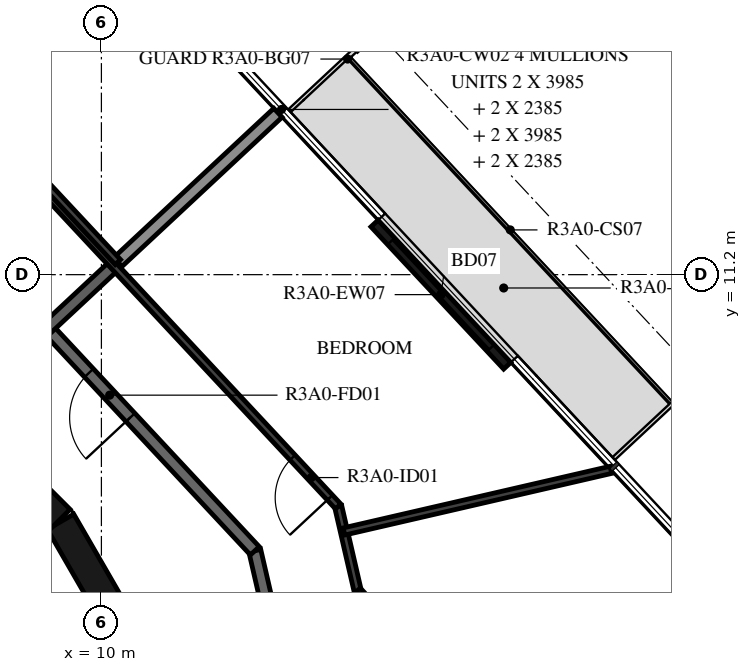
"""IFC4 building model, lengths in metres.
Left out: names, types, materials, properties, quantities, classifications, styles, units other than length and angle.
Written with IfcOpenShell. Run it as: python <this file> out.ifc"""

import sys

from ifc_helpers import new_model, si_unit, direction, frame, frame_2d, origin, place, context, subcontext, project, spatial, rectangle, extrude, element, fill, save


model = new_model("IFC4")
c1 = context("Model", 3, precision=1e-05, world=origin(), true_north=direction((0.0, 1.0)))
c2 = subcontext(c1, "Body", "Model", "MODEL_VIEW")
j1 = project(units=[si_unit("LENGTHUNIT", "METRE"), si_unit("PLANEANGLEUNIT", "RADIAN")], contexts=[c1])
p1 = place(None, origin())
s1 = spatial("IfcSite", under=j1, at=p1, CompositionType="ELEMENT")
p2 = place(p1, origin())
s2 = spatial("IfcBuilding", under=s1, at=p2, CompositionType="ELEMENT")
p3 = place(p2, frame((0.0, 0.0, 120.4)))
s3 = spatial("IfcBuildingStorey", under=s2, at=p3, CompositionType="ELEMENT", Elevation=120.4)
p4 = place(p3, frame((16.674, 9.701, 0.0), z_axis=(0.0, 0.0, 1.0), x_axis=(-0.681994703002, 0.731357111866, 0.0)))
e1 = element("IfcWall", 1, at=p4, inside=s3, PredefinedType="STANDARD", context=c2, shape_type="SweptSolid", body=[
    extrude(rectangle(XDim=3.2, YDim=0.16, at=frame_2d((1.6, 0.0))), origin(), (0.0, 0.0, 1.0), 3.12),
])
p5 = place(p4, frame((0.4, 0.0, 0.0)))
e2 = element("IfcOpeningElement", 2, at=p5, cuts=e1, PredefinedType="OPENING", context=c2, shape_type="SweptSolid", body=[
    extrude(rectangle(XDim=2.4, YDim=2.4, at=frame_2d((1.2, 1.2))), frame((0.0, 0.09, 0.0), z_axis=(0.0, -1.0, 0.0), x_axis=(1.0, 0.0, 0.0)), (0.0, 0.0, 1.0), 0.18),
])
p6 = place(p3, frame((10.845, 4.51, 0.0), z_axis=(0.0, 0.0, 1.0), x_axis=(-0.500087131594, 0.865975092491, 0.0)))
e3 = element("IfcWall", 3, at=p6, inside=s3, PredefinedType="SHEAR", context=c2, shape_type="SweptSolid", body=[
    extrude(rectangle(XDim=3.033, YDim=0.5, at=frame_2d((1.516, 0.0))), origin(), (0.0, 0.0, 1.0), 3.12),
])
p7 = place(p3, frame((9.308, 7.164, 0.0), z_axis=(0.0, 0.0, 1.0), x_axis=(-0.707106781187, 0.707106781187, 0.0)))
e4 = element("IfcWall", 4, at=p7, inside=s3, PredefinedType="SHEAR", context=c2, shape_type="SweptSolid", body=[
    extrude(rectangle(XDim=3.032, YDim=0.5, at=frame_2d((1.516, 0.0))), origin(), (0.0, 0.0, 1.0), 3.12),
])
p8 = place(p7, frame((0.416, 0.0, 0.0)))
e5 = element("IfcOpeningElement", 5, at=p8, cuts=e4, PredefinedType="OPENING", context=c2, shape_type="SweptSolid", body=[
    extrude(rectangle(XDim=1.2, YDim=2.1, at=frame_2d((0.6, 1.05))), frame((0.0, 0.26, 0.0), z_axis=(0.0, -1.0, 0.0), x_axis=(1.0, 0.0, 0.0)), (0.0, 0.0, 1.0), 0.52),
])
p9 = place(p3, frame((14.175, -0.495, 0.0), z_axis=(0.0, 0.0, 1.0), x_axis=(-0.224922649383, 0.974376622151, 0.0)))
e6 = element("IfcWall", 6, at=p9, inside=s3, PredefinedType="STANDARD", context=c2, shape_type="SweptSolid", body=[
    extrude(rectangle(XDim=7.342, YDim=0.2, at=frame_2d((3.671, 0.0))), origin(), (0.0, 0.0, 1.0), 3.12),
])
p10 = place(p3, frame((12.523, 6.659, 0.0), z_axis=(0.0, 0.0, 1.0), x_axis=(-0.682001841105, 0.731350455479, 0.0)))
e7 = element("IfcWall", 7, at=p10, inside=s3, PredefinedType="STANDARD", context=c2, shape_type="SweptSolid", body=[
    extrude(rectangle(XDim=7.342, YDim=0.2, at=frame_2d((3.671, 0.0))), origin(), (0.0, 0.0, 1.0), 3.12),
])
p11 = place(p10, frame((3.0, 0.0, 0.0)))
e8 = element("IfcOpeningElement", 8, at=p11, cuts=e7, PredefinedType="OPENING", context=c2, shape_type="SweptSolid", body=[
    extrude(rectangle(XDim=1.0, YDim=2.1, at=frame_2d((0.5, 1.05))), frame((0.0, 0.11, 0.0), z_axis=(0.0, -1.0, 0.0), x_axis=(1.0, 0.0, 0.0)), (0.0, 0.0, 1.0), 0.22),
])
p12 = place(p10, frame((5.209, 0.0, 0.0)))
e9 = element("IfcOpeningElement", 9, at=p12, cuts=e7, PredefinedType="OPENING", context=c2, shape_type="SweptSolid", body=[
    extrude(rectangle(XDim=1.0, YDim=2.1, at=frame_2d((0.5, 1.05))), frame((0.0, 0.11, 0.0), z_axis=(0.0, -1.0, 0.0), x_axis=(1.0, 0.0, 0.0)), (0.0, 0.0, 1.0), 0.22),
])
p13 = place(p3, frame((10.233, 11.372, 0.0), z_axis=(0.0, 0.0, 1.0), x_axis=(-0.731329353292, -0.682024469513, 0.0)))
e10 = element("IfcWall", 10, at=p13, inside=s3, PredefinedType="STANDARD", context=c2, shape_type="SweptSolid", body=[
    extrude(rectangle(XDim=1.54, YDim=0.2, at=frame_2d((0.77, 0.0))), origin(), (0.0, 0.0, 1.0), 3.12),
])
p14 = place(p3, frame((12.903, 13.862, 0.0), z_axis=(0.0, 0.0, 1.0), x_axis=(-0.731328084739, -0.682025829769, 0.0)))
e11 = element("IfcWall", 11, at=p14, inside=s3, PredefinedType="STANDARD", context=c2, shape_type="SweptSolid", body=[
    extrude(rectangle(XDim=3.6, YDim=0.2, at=frame_2d((1.8, 0.0))), origin(), (0.0, 0.0, 1.0), 2.73),
])
p15 = place(p3, frame((15.727, -0.549, 0.0), z_axis=(0.0, 0.0, 1.0), x_axis=(-0.22493611855, 0.974373512864, 0.0)))
e12 = element("IfcWall", 12, at=p15, inside=s3, PredefinedType="PARTITIONING", context=c2, shape_type="SweptSolid", body=[
    extrude(rectangle(XDim=8.146, YDim=0.12, at=frame_2d((4.073, 0.0))), origin(), (0.0, 0.0, 1.0), 3.12),
])
p16 = place(p15, frame((1.314, 0.0, 0.0)))
e13 = element("IfcOpeningElement", 13, at=p16, cuts=e12, PredefinedType="OPENING", context=c2, shape_type="SweptSolid", body=[
    extrude(rectangle(XDim=0.8, YDim=2.1, at=frame_2d((0.4, 1.05))), frame((0.0, 0.07, 0.0), z_axis=(0.0, -1.0, 0.0), x_axis=(1.0, 0.0, 0.0)), (0.0, 0.0, 1.0), 0.14),
])
p17 = place(p3, frame((13.894, 7.388, 0.0), z_axis=(0.0, 0.0, 1.0), x_axis=(-0.681994622729, 0.731357186721, 0.0)))
e14 = element("IfcWall", 14, at=p17, inside=s3, PredefinedType="PARTITIONING", context=c2, shape_type="SweptSolid", body=[
    extrude(rectangle(XDim=8.146, YDim=0.12, at=frame_2d((4.073, 0.0))), origin(), (0.0, 0.0, 1.0), 3.12),
])
p18 = place(p17, frame((0.2, 0.0, 0.0)))
e15 = element("IfcOpeningElement", 15, at=p18, cuts=e14, PredefinedType="OPENING", context=c2, shape_type="SweptSolid", body=[
    extrude(rectangle(XDim=0.9, YDim=2.1, at=frame_2d((0.45, 1.05))), frame((0.0, 0.07, 0.0), z_axis=(0.0, -1.0, 0.0), x_axis=(1.0, 0.0, 0.0)), (0.0, 0.0, 1.0), 0.14),
])
p19 = place(p3, frame((14.213, 6.006, 0.0), z_axis=(0.0, 0.0, 1.0), x_axis=(0.681982148724, -0.731368818601, 0.0)))
e16 = element("IfcWall", 16, at=p19, inside=s3, PredefinedType="PARTITIONING", context=c2, shape_type="SweptSolid", body=[
    extrude(rectangle(XDim=10.07, YDim=0.12, at=frame_2d((5.035, 0.0))), origin(), (0.0, 0.0, 1.0), 3.12),
])
p20 = place(p19, frame((5.235, 0.0, 0.0)))
e17 = element("IfcOpeningElement", 17, at=p20, cuts=e16, PredefinedType="OPENING", context=c2, shape_type="SweptSolid", body=[
    extrude(rectangle(XDim=0.9, YDim=2.1, at=frame_2d((0.45, 1.05))), frame((0.0, 0.07, 0.0), z_axis=(0.0, -1.0, 0.0), x_axis=(1.0, 0.0, 0.0)), (0.0, 0.0, 1.0), 0.14),
])
p21 = place(p3, frame((18.379, 7.99, 0.0), z_axis=(0.0, 0.0, 1.0), x_axis=(-0.974372926515, -0.224938658471, 0.0)))
e18 = element("IfcWall", 18, at=p21, inside=s3, PredefinedType="PARTITIONING", context=c2, shape_type="SweptSolid", body=[
    extrude(rectangle(XDim=4.505, YDim=0.12, at=frame_2d((2.253, 0.0))), origin(), (0.0, 0.0, 1.0), 3.12),
])
p22 = place(p3, frame((-1.539, 24.071, 0.0), z_axis=(0.0, 0.0, 1.0), x_axis=(0.68200220595, -0.731350115252, 0.0)))
e19 = element("IfcWall", 19, at=p22, inside=s3, PredefinedType="PARTITIONING", context=c2, shape_type="SweptSolid", body=[
    extrude(rectangle(XDim=17.316, YDim=0.12, at=frame_2d((8.658, 0.0))), origin(), (0.0, 0.0, 1.0), 3.12),
])
p23 = place(p22, frame((3.323, 0.0, 0.0)))
e20 = element("IfcOpeningElement", 20, at=p23, cuts=e19, PredefinedType="OPENING", context=c2, shape_type="SweptSolid", body=[
    extrude(rectangle(XDim=0.9, YDim=2.1, at=frame_2d((0.45, 1.05))), frame((0.0, 0.07, 0.0), z_axis=(0.0, -1.0, 0.0), x_axis=(1.0, 0.0, 0.0)), (0.0, 0.0, 1.0), 0.14),
])
p24 = place(p22, frame((1.417, 0.0, 0.0)))
e21 = element("IfcOpeningElement", 21, at=p24, cuts=e19, PredefinedType="OPENING", context=c2, shape_type="SweptSolid", body=[
    extrude(rectangle(XDim=0.9, YDim=2.1, at=frame_2d((0.45, 1.05))), frame((0.0, 0.07, 0.0), z_axis=(0.0, -1.0, 0.0), x_axis=(1.0, 0.0, 0.0)), (0.0, 0.0, 1.0), 0.14),
])
p25 = place(p5, origin())
e22 = element("IfcDoor", 22, at=p25, inside=s3, OperationType="DOUBLE_DOOR_SLIDING", PredefinedType="DOOR", context=c2, shape_type="SweptSolid", body=[
    extrude(rectangle(XDim=2.4, YDim=2.4, at=frame_2d((1.2, 1.2))), frame((0.0, 0.025, 0.0), z_axis=(0.0, -1.0, 0.0), x_axis=(1.0, 0.0, 0.0)), (0.0, 0.0, 1.0), 0.05),
])
fill(e2, e22)
p26 = place(p11, origin())
e23 = element("IfcDoor", 23, at=p26, inside=s3, OperationType="SINGLE_SWING_LEFT", PredefinedType="DOOR", context=c2, shape_type="SweptSolid", body=[
    extrude(rectangle(XDim=1.0, YDim=2.1, at=frame_2d((0.5, 1.05))), frame((0.0, 0.025, 0.0), z_axis=(0.0, -1.0, 0.0), x_axis=(1.0, 0.0, 0.0)), (0.0, 0.0, 1.0), 0.05),
])
fill(e8, e23)
p27 = place(p18, origin())
e24 = element("IfcDoor", 24, at=p27, inside=s3, OperationType="SINGLE_SWING_LEFT", PredefinedType="DOOR", context=c2, shape_type="SweptSolid", body=[
    extrude(rectangle(XDim=0.9, YDim=2.1, at=frame_2d((0.45, 1.05))), frame((0.0, 0.025, 0.0), z_axis=(0.0, -1.0, 0.0), x_axis=(1.0, 0.0, 0.0)), (0.0, 0.0, 1.0), 0.05),
])
fill(e15, e24)
save(model, sys.argv[1])
